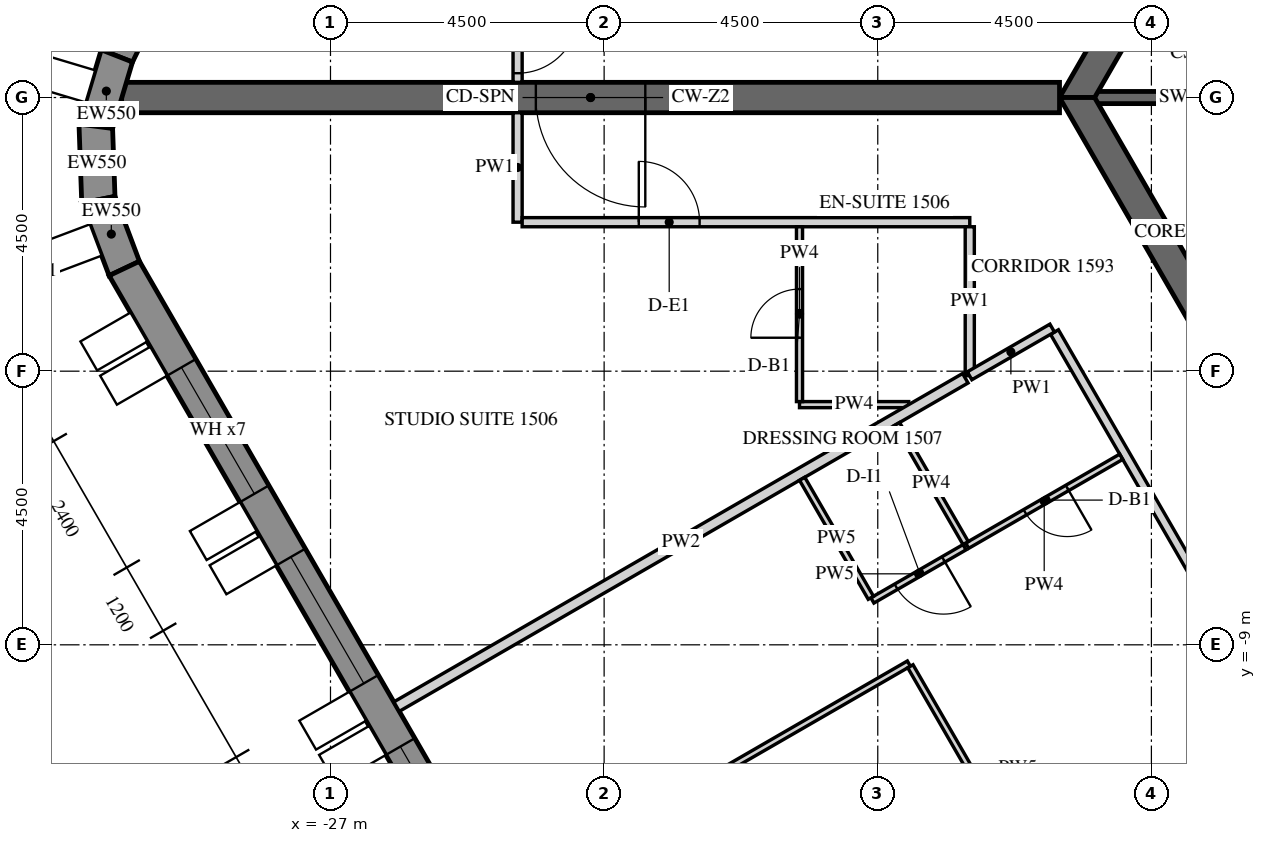
"""IFC4 building model, lengths in metres.
Left out: names, types, materials, properties, quantities, classifications, styles, units other than length and angle.
Written with IfcOpenShell. Run it as: python <this file> out.ifc"""

import sys

from ifc_helpers import new_model, si_unit, direction, frame, frame_2d, origin, place, context, subcontext, project, spatial, polyline, rectangle, outline, extrude, element, fill, save


model = new_model("IFC4")
c1 = context("Model", 3, precision=1e-05, world=origin(), true_north=direction((0.0, 1.0)))
c2 = subcontext(c1, "Body", "Model", "MODEL_VIEW")
j1 = project(units=[si_unit("LENGTHUNIT", "METRE"), si_unit("PLANEANGLEUNIT", "RADIAN")], contexts=[c1])
p1 = place(None, origin())
s1 = spatial("IfcSite", under=j1, at=p1, CompositionType="ELEMENT")
p2 = place(p1, origin())
s2 = spatial("IfcBuilding", under=s1, at=p2, CompositionType="ELEMENT")
p3 = place(p2, frame((0.0, 0.0, 195.6)))
s3 = spatial("IfcBuildingStorey", under=s2, at=p3, CompositionType="ELEMENT", Elevation=195.6)
p4 = place(p3, frame((-18.345, 25.633, -0.15), z_axis=(0.0, 0.0, 1.0), x_axis=(-0.43837181828, -0.898793718791, 0.0)))
e1 = element("IfcWall", 1, at=p4, inside=s3, PredefinedType="SOLIDWALL", context=c2, shape_type="SweptSolid", body=[
    extrude(outline(polyline([(-0.026, -0.275), (27.78, -0.275), (27.735, 0.275), (0.026, 0.275), (-0.026, -0.275)])), origin(), (0.0, 0.0, 1.0), 3.9),
])
p5 = place(p4, frame((1.879, 0.0, 1.05)))
e2 = element("IfcOpeningElement", 2, at=p5, cuts=e1, PredefinedType="OPENING", context=c2, shape_type="SweptSolid", body=[
    extrude(rectangle(XDim=2.4, YDim=2.4, at=frame_2d((1.2, 1.2))), frame((0.0, 0.285, 0.0), z_axis=(0.0, -1.0, 0.0), x_axis=(1.0, 0.0, 0.0)), (0.0, 0.0, 1.0), 0.57),
])
p6 = place(p4, frame((5.479, 0.0, 1.05)))
e3 = element("IfcOpeningElement", 3, at=p6, cuts=e1, PredefinedType="OPENING", context=c2, shape_type="SweptSolid", body=[
    extrude(rectangle(XDim=2.4, YDim=2.4, at=frame_2d((1.2, 1.2))), frame((0.0, 0.285, 0.0), z_axis=(0.0, -1.0, 0.0), x_axis=(1.0, 0.0, 0.0)), (0.0, 0.0, 1.0), 0.57),
])
p7 = place(p4, frame((9.079, 0.0, 1.05)))
e4 = element("IfcOpeningElement", 4, at=p7, cuts=e1, PredefinedType="OPENING", context=c2, shape_type="SweptSolid", body=[
    extrude(rectangle(XDim=2.4, YDim=2.4, at=frame_2d((1.2, 1.2))), frame((0.0, 0.285, 0.0), z_axis=(0.0, -1.0, 0.0), x_axis=(1.0, 0.0, 0.0)), (0.0, 0.0, 1.0), 0.57),
])
p8 = place(p4, frame((12.679, 0.0, 1.05)))
e5 = element("IfcOpeningElement", 5, at=p8, cuts=e1, PredefinedType="OPENING", context=c2, shape_type="SweptSolid", body=[
    extrude(rectangle(XDim=2.4, YDim=2.4, at=frame_2d((1.2, 1.2))), frame((0.0, 0.285, 0.0), z_axis=(0.0, -1.0, 0.0), x_axis=(1.0, 0.0, 0.0)), (0.0, 0.0, 1.0), 0.57),
])
p9 = place(p4, frame((16.279, 0.0, 1.05)))
e6 = element("IfcOpeningElement", 6, at=p9, cuts=e1, PredefinedType="OPENING", context=c2, shape_type="SweptSolid", body=[
    extrude(rectangle(XDim=2.4, YDim=2.4, at=frame_2d((1.2, 1.2))), frame((0.0, 0.285, 0.0), z_axis=(0.0, -1.0, 0.0), x_axis=(1.0, 0.0, 0.0)), (0.0, 0.0, 1.0), 0.57),
])
p10 = place(p4, frame((19.879, 0.0, 1.05)))
e7 = element("IfcOpeningElement", 7, at=p10, cuts=e1, PredefinedType="OPENING", context=c2, shape_type="SweptSolid", body=[
    extrude(rectangle(XDim=2.4, YDim=2.4, at=frame_2d((1.2, 1.2))), frame((0.0, 0.285, 0.0), z_axis=(0.0, -1.0, 0.0), x_axis=(1.0, 0.0, 0.0)), (0.0, 0.0, 1.0), 0.57),
])
p11 = place(p4, frame((23.479, 0.0, 1.05)))
e8 = element("IfcOpeningElement", 8, at=p11, cuts=e1, PredefinedType="OPENING", context=c2, shape_type="SweptSolid", body=[
    extrude(rectangle(XDim=2.4, YDim=2.4, at=frame_2d((1.2, 1.2))), frame((0.0, 0.285, 0.0), z_axis=(0.0, -1.0, 0.0), x_axis=(1.0, 0.0, 0.0)), (0.0, 0.0, 1.0), 0.57),
])
p12 = place(p3, frame((-30.513, 0.684, -0.15), z_axis=(0.0, 0.0, 1.0), x_axis=(-0.286736058109, -0.958009620505, 0.0)))
e9 = element("IfcWall", 9, at=p12, inside=s3, PredefinedType="SOLIDWALL", context=c2, shape_type="SweptSolid", body=[
    extrude(outline(polyline([(-0.022, -0.275), (1.253, -0.275), (1.163, 0.275), (0.022, 0.275), (-0.022, -0.275)])), origin(), (0.0, 0.0, 1.0), 3.9),
])
p13 = place(p3, frame((-30.86, -0.473, -0.15), z_axis=(0.0, 0.0, 1.0), x_axis=(0.03495638276, -0.999388838893, 0.0)))
e10 = element("IfcWall", 10, at=p13, inside=s3, PredefinedType="SOLIDWALL", context=c2, shape_type="SweptSolid", body=[
    extrude(outline(polyline([(-0.045, -0.275), (1.253, -0.275), (1.163, 0.275), (0.045, 0.275), (-0.045, -0.275)])), origin(), (0.0, 0.0, 1.0), 3.9),
])
p14 = place(p3, frame((-30.817, -1.681, -0.15), z_axis=(0.0, 0.0, 1.0), x_axis=(0.352850303963, -0.935679786569, 0.0)))
e11 = element("IfcWall", 11, at=p14, inside=s3, PredefinedType="SOLIDWALL", context=c2, shape_type="SweptSolid", body=[
    extrude(outline(polyline([(-0.045, -0.275), (1.23, -0.275), (1.186, 0.275), (0.045, 0.275), (-0.045, -0.275)])), origin(), (0.0, 0.0, 1.0), 3.9),
])
p15 = place(p3, frame((-30.391, -2.811, -0.15), z_axis=(0.0, 0.0, 1.0), x_axis=(0.499998569178, -0.866026229868, 0.0)))
e12 = element("IfcWall", 12, at=p15, inside=s3, PredefinedType="SOLIDWALL", context=c2, shape_type="SweptSolid", body=[
    extrude(outline(polyline([(-0.022, -0.275), (27.783, -0.275), (27.732, 0.275), (0.022, 0.275), (-0.022, -0.275)])), origin(), (0.0, 0.0, 1.0), 3.9),
])
p16 = place(p15, frame((1.879, 0.0, 1.05)))
e13 = element("IfcOpeningElement", 13, at=p16, cuts=e12, PredefinedType="OPENING", context=c2, shape_type="SweptSolid", body=[
    extrude(rectangle(XDim=2.4, YDim=2.4, at=frame_2d((1.2, 1.2))), frame((0.0, 0.285, 0.0), z_axis=(0.0, -1.0, 0.0), x_axis=(1.0, 0.0, 0.0)), (0.0, 0.0, 1.0), 0.57),
])
p17 = place(p15, frame((5.479, 0.0, 1.05)))
e14 = element("IfcOpeningElement", 14, at=p17, cuts=e12, PredefinedType="OPENING", context=c2, shape_type="SweptSolid", body=[
    extrude(rectangle(XDim=2.4, YDim=2.4, at=frame_2d((1.2, 1.2))), frame((0.0, 0.285, 0.0), z_axis=(0.0, -1.0, 0.0), x_axis=(1.0, 0.0, 0.0)), (0.0, 0.0, 1.0), 0.57),
])
p18 = place(p15, frame((9.079, 0.0, 1.05)))
e15 = element("IfcOpeningElement", 15, at=p18, cuts=e12, PredefinedType="OPENING", context=c2, shape_type="SweptSolid", body=[
    extrude(rectangle(XDim=2.4, YDim=2.4, at=frame_2d((1.2, 1.2))), frame((0.0, 0.285, 0.0), z_axis=(0.0, -1.0, 0.0), x_axis=(1.0, 0.0, 0.0)), (0.0, 0.0, 1.0), 0.57),
])
p19 = place(p15, frame((12.679, 0.0, 1.05)))
e16 = element("IfcOpeningElement", 16, at=p19, cuts=e12, PredefinedType="OPENING", context=c2, shape_type="SweptSolid", body=[
    extrude(rectangle(XDim=2.4, YDim=2.4, at=frame_2d((1.2, 1.2))), frame((0.0, 0.285, 0.0), z_axis=(0.0, -1.0, 0.0), x_axis=(1.0, 0.0, 0.0)), (0.0, 0.0, 1.0), 0.57),
])
p20 = place(p15, frame((16.279, 0.0, 1.05)))
e17 = element("IfcOpeningElement", 17, at=p20, cuts=e12, PredefinedType="OPENING", context=c2, shape_type="SweptSolid", body=[
    extrude(rectangle(XDim=2.4, YDim=2.4, at=frame_2d((1.2, 1.2))), frame((0.0, 0.285, 0.0), z_axis=(0.0, -1.0, 0.0), x_axis=(1.0, 0.0, 0.0)), (0.0, 0.0, 1.0), 0.57),
])
p21 = place(p15, frame((19.879, 0.0, 1.05)))
e18 = element("IfcOpeningElement", 18, at=p21, cuts=e12, PredefinedType="OPENING", context=c2, shape_type="SweptSolid", body=[
    extrude(rectangle(XDim=2.4, YDim=2.4, at=frame_2d((1.2, 1.2))), frame((0.0, 0.285, 0.0), z_axis=(0.0, -1.0, 0.0), x_axis=(1.0, 0.0, 0.0)), (0.0, 0.0, 1.0), 0.57),
])
p22 = place(p15, frame((23.479, 0.0, 1.05)))
e19 = element("IfcOpeningElement", 19, at=p22, cuts=e12, PredefinedType="OPENING", context=c2, shape_type="SweptSolid", body=[
    extrude(rectangle(XDim=2.4, YDim=2.4, at=frame_2d((1.2, 1.2))), frame((0.0, 0.285, 0.0), z_axis=(0.0, -1.0, 0.0), x_axis=(1.0, 0.0, 0.0)), (0.0, 0.0, 1.0), 0.57),
])
p23 = place(p3, frame((-7.361, 12.75, -0.15), z_axis=(0.0, 0.0, 1.0), x_axis=(-0.50000571537, -0.866022103989, 0.0)))
e20 = element("IfcWall", 20, at=p23, inside=s3, PredefinedType="SHEAR", context=c2, shape_type="SweptSolid", body=[
    extrude(outline(polyline([(-0.144, -0.25), (14.867, -0.25), (14.578, 0.25), (0.144, 0.25), (-0.144, -0.25)])), origin(), (0.0, 0.0, 1.0), 3.9),
])
p24 = place(p23, frame((6.49, 0.0, 0.15)))
e21 = element("IfcOpeningElement", 21, at=p24, cuts=e20, PredefinedType="OPENING", context=c2, shape_type="SweptSolid", body=[
    extrude(rectangle(XDim=1.8, YDim=2.4, at=frame_2d((0.9, 1.2))), frame((0.0, 0.26, 0.0), z_axis=(0.0, -1.0, 0.0), x_axis=(1.0, 0.0, 0.0)), (0.0, 0.0, 1.0), 0.52),
])
p25 = place(p3, frame((-14.722, 0.0, -0.15), z_axis=(0.0, 0.0, 1.0), x_axis=(0.50000571537, -0.866022103989, 0.0)))
e22 = element("IfcWall", 22, at=p25, inside=s3, PredefinedType="SHEAR", context=c2, shape_type="SweptSolid", body=[
    extrude(outline(polyline([(-0.144, -0.25), (14.867, -0.25), (14.578, 0.25), (0.144, 0.25), (-0.144, -0.25)])), origin(), (0.0, 0.0, 1.0), 3.9),
])
p26 = place(p25, frame((6.432, 0.0, 0.15)))
e23 = element("IfcOpeningElement", 23, at=p26, cuts=e22, PredefinedType="OPENING", context=c2, shape_type="SweptSolid", body=[
    extrude(rectangle(XDim=1.8, YDim=2.4, at=frame_2d((0.9, 1.2))), frame((0.0, 0.26, 0.0), z_axis=(0.0, -1.0, 0.0), x_axis=(1.0, 0.0, 0.0)), (0.0, 0.0, 1.0), 0.52),
])
p27 = place(p3, frame((-15.011, 0.0, -0.15), z_axis=(0.0, 0.0, 1.0), x_axis=(-1.0, 0.0, 0.0)))
e24 = element("IfcWall", 24, at=p27, inside=s3, PredefinedType="SHEAR", context=c2, shape_type="SweptSolid", body=[
    extrude(rectangle(XDim=15.424, YDim=0.5, at=frame_2d((7.712, 0.0))), origin(), (0.0, 0.0, 1.0), 3.9),
])
p28 = place(p27, frame((6.812, 0.0, 0.15)))
e25 = element("IfcOpeningElement", 25, at=p28, cuts=e24, PredefinedType="OPENING", context=c2, shape_type="SweptSolid", body=[
    extrude(rectangle(XDim=1.8, YDim=2.4, at=frame_2d((0.9, 1.2))), frame((0.0, 0.26, 0.0), z_axis=(0.0, -1.0, 0.0), x_axis=(1.0, 0.0, 0.0)), (0.0, 0.0, 1.0), 0.52),
])
p29 = place(p3, frame((-11.547, 0.0, -0.15), z_axis=(0.0, 0.0, 1.0), x_axis=(-1.0, 0.0, 0.0)))
e26 = element("IfcWall", 26, at=p29, inside=s3, PredefinedType="SHEAR", context=c2, shape_type="SweptSolid", body=[
    extrude(rectangle(XDim=2.887, YDim=0.2, at=frame_2d((1.443, 0.0))), origin(), (0.0, 0.0, 1.0), 3.9),
])
p30 = place(p3, frame((-23.923, 1.975, 0.0), z_axis=(0.0, 0.0, 1.0), x_axis=(0.0, -1.0, 0.0)))
e27 = element("IfcWall", 27, at=p30, inside=s3, PredefinedType="PARTITIONING", context=c2, shape_type="SweptSolid", body=[
    extrude(rectangle(XDim=1.725, YDim=0.15, at=frame_2d((0.863, 0.0))), origin(), (0.0, 0.0, 1.0), 2.988),
])
p31 = place(p30, frame((0.575, 0.0, 0.0)))
e28 = element("IfcOpeningElement", 28, at=p31, cuts=e27, PredefinedType="OPENING", context=c2, shape_type="SweptSolid", body=[
    extrude(rectangle(XDim=1.0, YDim=2.1, at=frame_2d((0.5, 1.05))), frame((0.0, 0.085, 0.0), z_axis=(0.0, -1.0, 0.0), x_axis=(1.0, 0.0, 0.0)), (0.0, 0.0, 1.0), 0.17),
])
p32 = place(p3, frame((-23.923, -0.25, 0.0), z_axis=(0.0, 0.0, 1.0), x_axis=(0.0, -1.0, 0.0)))
e29 = element("IfcWall", 29, at=p32, inside=s3, PredefinedType="PARTITIONING", context=c2, shape_type="SweptSolid", body=[
    extrude(rectangle(XDim=1.8, YDim=0.15, at=frame_2d((0.9, 0.0))), origin(), (0.0, 0.0, 1.0), 2.988),
])
p33 = place(p3, frame((-23.848, -2.05, 0.0), z_axis=(0.0, 0.0, 1.0), x_axis=(1.0, 0.0, 0.0)))
e30 = element("IfcWall", 30, at=p33, inside=s3, PredefinedType="PARTITIONING", context=c2, shape_type="SweptSolid", body=[
    extrude(rectangle(XDim=7.361, YDim=0.15, at=frame_2d((3.68, 0.0))), origin(), (0.0, 0.0, 1.0), 2.988),
])
p34 = place(p33, frame((1.918, 0.0, 0.0)))
e31 = element("IfcOpeningElement", 31, at=p34, cuts=e30, PredefinedType="OPENING", context=c2, shape_type="SweptSolid", body=[
    extrude(rectangle(XDim=1.0, YDim=2.1, at=frame_2d((0.5, 1.05))), frame((0.0, 0.085, 0.0), z_axis=(0.0, -1.0, 0.0), x_axis=(1.0, 0.0, 0.0)), (0.0, 0.0, 1.0), 0.17),
])
p35 = place(p3, frame((-16.487, -2.125, 0.0), z_axis=(0.0, 0.0, 1.0), x_axis=(0.0, -1.0, 0.0)))
e32 = element("IfcWall", 32, at=p35, inside=s3, PredefinedType="PARTITIONING", context=c2, shape_type="SweptSolid", body=[
    extrude(rectangle(XDim=2.449, YDim=0.15, at=frame_2d((1.225, 0.0))), origin(), (0.0, 0.0, 1.0), 2.988),
])
p36 = place(p3, frame((-15.094, -3.856, 0.0), z_axis=(0.0, 0.0, 1.0), x_axis=(0.500006037985, -0.866021917724, 0.0)))
e33 = element("IfcWall", 33, at=p36, inside=s3, PredefinedType="PARTITIONING", context=c2, shape_type="SweptSolid", body=[
    extrude(rectangle(XDim=12.867, YDim=0.15, at=frame_2d((6.434, 0.0))), origin(), (0.0, 0.0, 1.0), 2.988),
])
p37 = place(p36, frame((6.025, 0.0, 0.0)))
e34 = element("IfcOpeningElement", 34, at=p37, cuts=e33, PredefinedType="OPENING", context=c2, shape_type="SweptSolid", body=[
    extrude(rectangle(XDim=1.0, YDim=2.1, at=frame_2d((0.5, 1.05))), frame((0.0, 0.085, 0.0), z_axis=(0.0, -1.0, 0.0), x_axis=(1.0, 0.0, 0.0)), (0.0, 0.0, 1.0), 0.17),
])
p38 = place(p36, frame((11.717, 0.0, 0.0)))
e35 = element("IfcOpeningElement", 35, at=p38, cuts=e33, PredefinedType="OPENING", context=c2, shape_type="SweptSolid", body=[
    extrude(rectangle(XDim=1.0, YDim=2.1, at=frame_2d((0.5, 1.05))), frame((0.0, 0.085, 0.0), z_axis=(0.0, -1.0, 0.0), x_axis=(1.0, 0.0, 0.0)), (0.0, 0.0, 1.0), 0.17),
])
p39 = place(p3, frame((-16.49, -4.576, 0.0), z_axis=(0.0, 0.0, 1.0), x_axis=(0.865993845424, 0.5000546567, 0.0)))
e36 = element("IfcWall", 36, at=p39, inside=s3, PredefinedType="PARTITIONING", context=c2, shape_type="SweptSolid", body=[
    extrude(rectangle(XDim=1.569, YDim=0.15, at=frame_2d((0.785, 0.0))), origin(), (0.0, 0.0, 1.0), 2.988),
])
p40 = place(p3, frame((-17.491, -5.05, 0.0), z_axis=(0.0, 0.0, 1.0), x_axis=(-1.0, 0.0, 0.0)))
e37 = element("IfcWall", 37, at=p40, inside=s3, PredefinedType="PARTITIONING", context=c2, shape_type="SweptSolid", body=[
    extrude(rectangle(XDim=1.796, YDim=0.1, at=frame_2d((0.898, 0.0))), origin(), (0.0, 0.0, 1.0), 2.988),
])
p41 = place(p3, frame((-19.287, -5.0, 0.0), z_axis=(0.0, 0.0, 1.0), x_axis=(0.0, 1.0, 0.0)))
e38 = element("IfcWall", 38, at=p41, inside=s3, PredefinedType="PARTITIONING", context=c2, shape_type="SweptSolid", body=[
    extrude(rectangle(XDim=2.875, YDim=0.1, at=frame_2d((1.438, 0.0))), origin(), (0.0, 0.0, 1.0), 2.988),
])
p42 = place(p41, frame((1.05, 0.0, 0.0)))
e39 = element("IfcOpeningElement", 39, at=p42, cuts=e38, PredefinedType="OPENING", context=c2, shape_type="SweptSolid", body=[
    extrude(rectangle(XDim=0.8, YDim=2.1, at=frame_2d((0.4, 1.05))), frame((0.0, 0.06, 0.0), z_axis=(0.0, -1.0, 0.0), x_axis=(1.0, 0.0, 0.0)), (0.0, 0.0, 1.0), 0.12),
])
p43 = place(p3, frame((-25.914, -10.017, 0.0), z_axis=(0.0, 0.0, 1.0), x_axis=(0.866019956843, 0.50000943426, 0.0)))
e40 = element("IfcWall", 40, at=p43, inside=s3, PredefinedType="PARTITIONING", context=c2, shape_type="SweptSolid", body=[
    extrude(rectangle(XDim=10.801, YDim=0.18, at=frame_2d((5.4, 0.0))), origin(), (0.0, 0.0, 1.0), 2.988),
])
p44 = place(p3, frame((-13.996, -5.907, 0.0), z_axis=(0.0, 0.0, 1.0), x_axis=(-0.86601045545, -0.500025890382, 0.0)))
e41 = element("IfcWall", 41, at=p44, inside=s3, PredefinedType="PARTITIONING", context=c2, shape_type="SweptSolid", body=[
    extrude(rectangle(XDim=2.925, YDim=0.1, at=frame_2d((1.462, 0.0))), origin(), (0.0, 0.0, 1.0), 2.988),
])
p45 = place(p44, frame((1.025, 0.0, 0.0)))
e42 = element("IfcOpeningElement", 42, at=p45, cuts=e41, PredefinedType="OPENING", context=c2, shape_type="SweptSolid", body=[
    extrude(rectangle(XDim=0.8, YDim=2.1, at=frame_2d((0.4, 1.05))), frame((0.0, 0.06, 0.0), z_axis=(0.0, -1.0, 0.0), x_axis=(1.0, 0.0, 0.0)), (0.0, 0.0, 1.0), 0.12),
])
p46 = place(p3, frame((-16.573, -7.395, 0.0), z_axis=(0.0, 0.0, 1.0), x_axis=(-0.866036909293, -0.499980071345, 0.0)))
e43 = element("IfcWall", 43, at=p46, inside=s3, PredefinedType="PARTITIONING", context=c2, shape_type="SweptSolid", body=[
    extrude(rectangle(XDim=1.75, YDim=0.1, at=frame_2d((0.875, 0.0))), origin(), (0.0, 0.0, 1.0), 2.988),
])
p47 = place(p46, frame((0.4, 0.0, 0.0)))
e44 = element("IfcOpeningElement", 44, at=p47, cuts=e43, PredefinedType="OPENING", context=c2, shape_type="SweptSolid", body=[
    extrude(rectangle(XDim=0.9, YDim=2.1, at=frame_2d((0.45, 1.05))), frame((0.0, 0.06, 0.0), z_axis=(0.0, -1.0, 0.0), x_axis=(1.0, 0.0, 0.0)), (0.0, 0.0, 1.0), 0.12),
])
p48 = place(p3, frame((-18.113, -8.227, 0.0), z_axis=(0.0, 0.0, 1.0), x_axis=(-0.500031020067, 0.8660074936, 0.0)))
e45 = element("IfcWall", 45, at=p48, inside=s3, PredefinedType="PARTITIONING", context=c2, shape_type="SweptSolid", body=[
    extrude(rectangle(XDim=2.26, YDim=0.1, at=frame_2d((1.13, 0.0))), origin(), (0.0, 0.0, 1.0), 2.988),
])
p49 = place(p3, frame((-24.114, -13.134, 0.0), z_axis=(0.0, 0.0, 1.0), x_axis=(0.866033062874, 0.499986733834, 0.0)))
e46 = element("IfcWall", 46, at=p49, inside=s3, PredefinedType="PARTITIONING", context=c2, shape_type="SweptSolid", body=[
    extrude(rectangle(XDim=7.65, YDim=0.1, at=frame_2d((3.825, 0.0))), origin(), (0.0, 0.0, 1.0), 2.988),
])
p50 = place(p3, frame((-17.463, -9.353, 0.0), z_axis=(0.0, 0.0, 1.0), x_axis=(0.499995846692, -0.866027801685, 0.0)))
e47 = element("IfcWall", 47, at=p50, inside=s3, PredefinedType="PARTITIONING", context=c2, shape_type="SweptSolid", body=[
    extrude(rectangle(XDim=7.06, YDim=0.1, at=frame_2d((3.53, 0.0))), origin(), (0.0, 0.0, 1.0), 2.988),
])
p51 = place(p50, frame((3.1, 0.0, 0.0)))
e48 = element("IfcOpeningElement", 48, at=p51, cuts=e47, PredefinedType="OPENING", context=c2, shape_type="SweptSolid", body=[
    extrude(rectangle(XDim=0.9, YDim=2.1, at=frame_2d((0.45, 1.05))), frame((0.0, 0.06, 0.0), z_axis=(0.0, -1.0, 0.0), x_axis=(1.0, 0.0, 0.0)), (0.0, 0.0, 1.0), 0.12),
])
p52 = place(p3, frame((-17.685, -5.37, 0.0), z_axis=(0.0, 0.0, 1.0), x_axis=(0.500077800282, -0.865980481111, 0.0)))
e49 = element("IfcWall", 49, at=p52, inside=s3, PredefinedType="PARTITIONING", context=c2, shape_type="SweptSolid", body=[
    extrude(rectangle(XDim=2.26, YDim=0.1, at=frame_2d((1.13, 0.0))), origin(), (0.0, 0.0, 1.0), 2.988),
])
p53 = place(p16, frame((0.0, 0.205, 0.0)))
e50 = element("IfcWindow", 50, at=p53, inside=s3, PartitioningType="DOUBLE_PANEL_VERTICAL", PredefinedType="WINDOW", context=c2, shape_type="SweptSolid", body=[
    extrude(rectangle(XDim=2.4, YDim=2.4, at=frame_2d((1.2, 1.2))), frame((0.0, 0.03, 0.0), z_axis=(0.0, -1.0, 0.0), x_axis=(1.0, 0.0, 0.0)), (0.0, 0.0, 1.0), 0.06),
])
fill(e13, e50)
p54 = place(p17, frame((0.0, 0.205, 0.0)))
e51 = element("IfcWindow", 51, at=p54, inside=s3, PartitioningType="DOUBLE_PANEL_VERTICAL", PredefinedType="WINDOW", context=c2, shape_type="SweptSolid", body=[
    extrude(rectangle(XDim=2.4, YDim=2.4, at=frame_2d((1.2, 1.2))), frame((0.0, 0.03, 0.0), z_axis=(0.0, -1.0, 0.0), x_axis=(1.0, 0.0, 0.0)), (0.0, 0.0, 1.0), 0.06),
])
fill(e14, e51)
p55 = place(p18, frame((0.0, 0.205, 0.0)))
e52 = element("IfcWindow", 52, at=p55, inside=s3, PartitioningType="DOUBLE_PANEL_VERTICAL", PredefinedType="WINDOW", context=c2, shape_type="SweptSolid", body=[
    extrude(rectangle(XDim=2.4, YDim=2.4, at=frame_2d((1.2, 1.2))), frame((0.0, 0.03, 0.0), z_axis=(0.0, -1.0, 0.0), x_axis=(1.0, 0.0, 0.0)), (0.0, 0.0, 1.0), 0.06),
])
fill(e15, e52)
p56 = place(p28, origin())
e53 = element("IfcDoor", 53, at=p56, inside=s3, OperationType="DOUBLE_DOOR_SINGLE_SWING", PredefinedType="DOOR", context=c2, shape_type="SweptSolid", body=[
    extrude(rectangle(XDim=1.8, YDim=2.4, at=frame_2d((0.9, 1.2))), frame((0.0, 0.025, 0.0), z_axis=(0.0, -1.0, 0.0), x_axis=(1.0, 0.0, 0.0)), (0.0, 0.0, 1.0), 0.05),
])
fill(e25, e53)
p57 = place(p31, origin())
e54 = element("IfcDoor", 54, at=p57, inside=s3, OperationType="SINGLE_SWING_LEFT", PredefinedType="DOOR", context=c2, shape_type="SweptSolid", body=[
    extrude(rectangle(XDim=1.0, YDim=2.1, at=frame_2d((0.5, 1.05))), frame((0.0, 0.025, 0.0), z_axis=(0.0, -1.0, 0.0), x_axis=(1.0, 0.0, 0.0)), (0.0, 0.0, 1.0), 0.05),
])
fill(e28, e54)
p58 = place(p34, origin())
e55 = element("IfcDoor", 55, at=p58, inside=s3, OperationType="SINGLE_SWING_LEFT", PredefinedType="DOOR", context=c2, shape_type="SweptSolid", body=[
    extrude(rectangle(XDim=1.0, YDim=2.1, at=frame_2d((0.5, 1.05))), frame((0.0, 0.025, 0.0), z_axis=(0.0, -1.0, 0.0), x_axis=(1.0, 0.0, 0.0)), (0.0, 0.0, 1.0), 0.05),
])
fill(e31, e55)
p59 = place(p42, origin())
e56 = element("IfcDoor", 56, at=p59, inside=s3, OperationType="SINGLE_SWING_LEFT", PredefinedType="DOOR", context=c2, shape_type="SweptSolid", body=[
    extrude(rectangle(XDim=0.8, YDim=2.1, at=frame_2d((0.4, 1.05))), frame((0.0, 0.025, 0.0), z_axis=(0.0, -1.0, 0.0), x_axis=(1.0, 0.0, 0.0)), (0.0, 0.0, 1.0), 0.05),
])
fill(e39, e56)
p60 = place(p45, origin())
e57 = element("IfcDoor", 57, at=p60, inside=s3, OperationType="SINGLE_SWING_RIGHT", PredefinedType="DOOR", context=c2, shape_type="SweptSolid", body=[
    extrude(rectangle(XDim=0.8, YDim=2.1, at=frame_2d((0.4, 1.05))), frame((0.0, 0.025, 0.0), z_axis=(0.0, -1.0, 0.0), x_axis=(1.0, 0.0, 0.0)), (0.0, 0.0, 1.0), 0.05),
])
fill(e42, e57)
p61 = place(p47, origin())
e58 = element("IfcDoor", 58, at=p61, inside=s3, OperationType="SINGLE_SWING_RIGHT", PredefinedType="DOOR", context=c2, shape_type="SweptSolid", body=[
    extrude(rectangle(XDim=0.9, YDim=2.1, at=frame_2d((0.45, 1.05))), frame((0.0, 0.025, 0.0), z_axis=(0.0, -1.0, 0.0), x_axis=(1.0, 0.0, 0.0)), (0.0, 0.0, 1.0), 0.05),
])
fill(e44, e58)
save(model, sys.argv[1])
